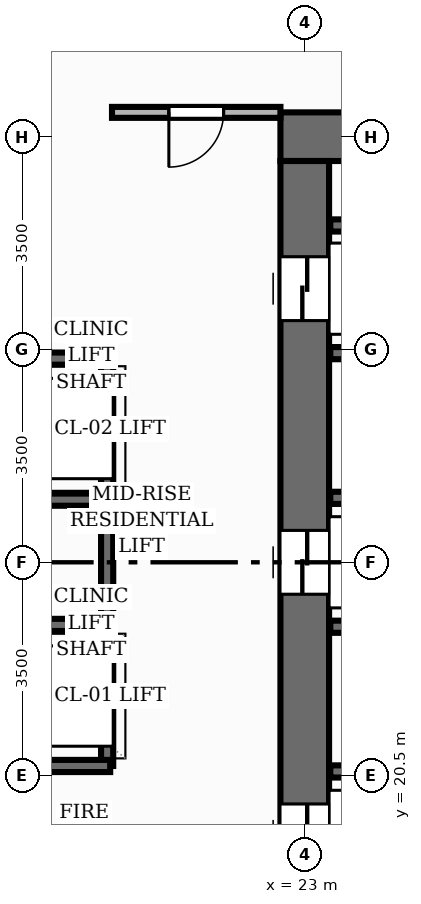
"""IFC4 building model, lengths in metres.
Left out: names, types, materials, properties, quantities, classifications, styles, units other than length and angle.
Written with IfcOpenShell. Run it as: python <this file> out.ifc"""

import sys

from ifc_helpers import new_model, si_unit, direction, frame, frame_2d, origin, place, context, subcontext, project, spatial, rectangle, extrude, element, fill, save


model = new_model("IFC4")
c1 = context("Model", 3, precision=1e-05, world=origin(), true_north=direction((0.0, 1.0)))
c2 = subcontext(c1, "Body", "Model", "MODEL_VIEW")
j1 = project(units=[si_unit("LENGTHUNIT", "METRE"), si_unit("PLANEANGLEUNIT", "RADIAN")], contexts=[c1])
p1 = place(None, origin())
s1 = spatial("IfcSite", under=j1, at=p1, CompositionType="ELEMENT")
p2 = place(p1, origin())
s2 = spatial("IfcBuilding", under=s1, at=p2, CompositionType="ELEMENT")
p3 = place(p2, origin())
s3 = spatial("IfcBuildingStorey", under=s2, at=p3, CompositionType="ELEMENT", Elevation=0.0)
p4 = place(p3, frame((22.6, 31.0, 0.0), z_axis=(0.0, 0.0, 1.0), x_axis=(1.0, 0.0, 0.0)))
e1 = element("IfcWall", 1, at=p4, inside=s3, PredefinedType="SHEAR", context=c2, shape_type="SweptSolid", body=[
    extrude(rectangle(XDim=18.8, YDim=0.8, at=frame_2d((9.4, 0.0))), origin(), (0.0, 0.0, 1.0), 4.0),
])
p5 = place(p4, frame((11.8, 0.0, 0.0)))
e2 = element("IfcOpeningElement", 2, at=p5, cuts=e1, PredefinedType="OPENING", context=c2, shape_type="SweptSolid", body=[
    extrude(rectangle(XDim=1.1, YDim=2.15, at=frame_2d((0.55, 1.075))), frame((0.0, 0.41, 0.0), z_axis=(0.0, -1.0, 0.0), x_axis=(1.0, 0.0, 0.0)), (0.0, 0.0, 1.0), 0.82),
])
p6 = place(p4, frame((4.425, 0.0, 0.0)))
e3 = element("IfcOpeningElement", 3, at=p6, cuts=e1, PredefinedType="OPENING", context=c2, shape_type="SweptSolid", body=[
    extrude(rectangle(XDim=1.05, YDim=2.15, at=frame_2d((0.525, 1.075))), frame((0.0, 0.41, 0.0), z_axis=(0.0, -1.0, 0.0), x_axis=(1.0, 0.0, 0.0)), (0.0, 0.0, 1.0), 0.82),
])
p7 = place(p4, frame((6.175, 0.0, 0.0)))
e4 = element("IfcOpeningElement", 4, at=p7, cuts=e1, PredefinedType="OPENING", context=c2, shape_type="SweptSolid", body=[
    extrude(rectangle(XDim=1.05, YDim=2.15, at=frame_2d((0.525, 1.075))), frame((0.0, 0.41, 0.0), z_axis=(0.0, -1.0, 0.0), x_axis=(1.0, 0.0, 0.0)), (0.0, 0.0, 1.0), 0.82),
])
p8 = place(p4, frame((7.925, 0.0, 0.0)))
e5 = element("IfcOpeningElement", 5, at=p8, cuts=e1, PredefinedType="OPENING", context=c2, shape_type="SweptSolid", body=[
    extrude(rectangle(XDim=1.05, YDim=2.15, at=frame_2d((0.525, 1.075))), frame((0.0, 0.41, 0.0), z_axis=(0.0, -1.0, 0.0), x_axis=(1.0, 0.0, 0.0)), (0.0, 0.0, 1.0), 0.82),
])
p9 = place(p3, frame((23.0, 17.4, 0.0), z_axis=(0.0, 0.0, 1.0), x_axis=(0.0, 1.0, 0.0)))
e6 = element("IfcWall", 6, at=p9, inside=s3, PredefinedType="SHEAR", context=c2, shape_type="SweptSolid", body=[
    extrude(rectangle(XDim=13.2, YDim=0.8, at=frame_2d((6.6, 0.0))), origin(), (0.0, 0.0, 1.0), 4.0),
])
p10 = place(p9, frame((1.575, 0.0, 0.0)))
e7 = element("IfcOpeningElement", 7, at=p10, cuts=e6, PredefinedType="OPENING", context=c2, shape_type="SweptSolid", body=[
    extrude(rectangle(XDim=1.05, YDim=2.15, at=frame_2d((0.525, 1.075))), frame((0.0, 0.41, 0.0), z_axis=(0.0, -1.0, 0.0), x_axis=(1.0, 0.0, 0.0)), (0.0, 0.0, 1.0), 0.82),
])
p11 = place(p9, frame((6.075, 0.0, 0.0)))
e8 = element("IfcOpeningElement", 8, at=p11, cuts=e6, PredefinedType="OPENING", context=c2, shape_type="SweptSolid", body=[
    extrude(rectangle(XDim=1.05, YDim=2.15, at=frame_2d((0.525, 1.075))), frame((0.0, 0.41, 0.0), z_axis=(0.0, -1.0, 0.0), x_axis=(1.0, 0.0, 0.0)), (0.0, 0.0, 1.0), 0.82),
])
p12 = place(p9, frame((10.575, 0.0, 0.0)))
e9 = element("IfcOpeningElement", 9, at=p12, cuts=e6, PredefinedType="OPENING", context=c2, shape_type="SweptSolid", body=[
    extrude(rectangle(XDim=1.05, YDim=2.15, at=frame_2d((0.525, 1.075))), frame((0.0, 0.41, 0.0), z_axis=(0.0, -1.0, 0.0), x_axis=(1.0, 0.0, 0.0)), (0.0, 0.0, 1.0), 0.82),
])
for number, where, z_axis, x_axis in (
    (10, (23.42, 29.54, 0.0), (0.0, 0.0, 1.0), (1.0, 0.0, 0.0)),
    (11, (23.42, 20.56, 0.0), (0.0, 0.0, 1.0), (1.0, 0.0, 0.0)),
    (12, (23.42, 22.94, 0.0), (0.0, 0.0, 1.0), (1.0, 0.0, 0.0)),
    (13, (23.42, 25.06, 0.0), (0.0, 0.0, 1.0), (1.0, 0.0, 0.0)),
    (14, (23.42, 27.44, 0.0), (0.0, 0.0, 1.0), (1.0, 0.0, 0.0)),
):
    element("IfcWall", number, at=place(p3, frame(where, z_axis=z_axis, x_axis=x_axis)), inside=s3, PredefinedType="SHEAR", context=c2, shape_type="SweptSolid", body=[
        extrude(rectangle(XDim=1.71, YDim=0.2, at=frame_2d((0.855, 0.0))), origin(), (0.0, 0.0, 1.0), 4.0),
    ])
p13 = place(p3, frame((19.75, 20.65, 0.0), z_axis=(0.0, 0.0, 1.0), x_axis=(0.0, 1.0, 0.0)))
e15 = element("IfcWall", 15, at=p13, inside=s3, PredefinedType="SHEAR", context=c2, shape_type="SweptSolid", body=[
    extrude(rectangle(XDim=6.7, YDim=0.2, at=frame_2d((3.35, 0.0))), origin(), (0.0, 0.0, 1.0), 4.0),
])
for number, where, z_axis, x_axis in (
    (16, (17.8, 20.65, 0.0), (0.0, 0.0, 1.0), (1.0, 0.0, 0.0)),
    (17, (17.8, 27.35, 0.0), (0.0, 0.0, 1.0), (1.0, 0.0, 0.0)),
):
    element("IfcWall", number, at=place(p3, frame(where, z_axis=z_axis, x_axis=x_axis)), inside=s3, PredefinedType="SHEAR", context=c2, shape_type="SweptSolid", body=[
        extrude(rectangle(XDim=2.0, YDim=0.2, at=frame_2d((1.0, 0.0))), origin(), (0.0, 0.0, 1.0), 4.0),
    ])
for number, where, z_axis, x_axis in (
    (18, (17.92, 22.97, 0.0), (0.0, 0.0, 1.0), (1.0, 0.0, 0.0)),
    (19, (17.92, 25.03, 0.0), (0.0, 0.0, 1.0), (1.0, 0.0, 0.0)),
):
    element("IfcWall", number, at=place(p3, frame(where, z_axis=z_axis, x_axis=x_axis)), inside=s3, PredefinedType="SHEAR", context=c2, shape_type="SweptSolid", body=[
        extrude(rectangle(XDim=1.76, YDim=0.2, at=frame_2d((0.88, 0.0))), origin(), (0.0, 0.0, 1.0), 4.0),
    ])
p14 = place(p3, frame((22.6, 31.4, 0.0), z_axis=(0.0, 0.0, 1.0), x_axis=(-1.0, 0.0, 0.0)))
e20 = element("IfcWall", 20, at=p14, inside=s3, PredefinedType="PARTITIONING", context=c2, shape_type="SweptSolid", body=[
    extrude(rectangle(XDim=2.77, YDim=0.18, at=frame_2d((1.385, 0.0))), origin(), (0.0, 0.0, 1.0), 3.715),
])
p15 = place(p14, frame((0.935, 0.0, 0.0)))
e21 = element("IfcOpeningElement", 21, at=p15, cuts=e20, PredefinedType="OPENING", context=c2, shape_type="SweptSolid", body=[
    extrude(rectangle(XDim=0.9, YDim=2.1, at=frame_2d((0.45, 1.05))), frame((0.0, 0.1, 0.0), z_axis=(0.0, -1.0, 0.0), x_axis=(1.0, 0.0, 0.0)), (0.0, 0.0, 1.0), 0.2),
])
p16 = place(p10, origin())
e22 = element("IfcDoor", 22, at=p16, inside=s3, OperationType="DOUBLE_DOOR_SLIDING", PredefinedType="DOOR", context=c2, shape_type="SweptSolid", body=[
    extrude(rectangle(XDim=1.05, YDim=2.15, at=frame_2d((0.525, 1.075))), frame((0.0, 0.025, 0.0), z_axis=(0.0, -1.0, 0.0), x_axis=(1.0, 0.0, 0.0)), (0.0, 0.0, 1.0), 0.05),
])
fill(e7, e22)
p17 = place(p11, origin())
e23 = element("IfcDoor", 23, at=p17, inside=s3, OperationType="DOUBLE_DOOR_SLIDING", PredefinedType="DOOR", context=c2, shape_type="SweptSolid", body=[
    extrude(rectangle(XDim=1.05, YDim=2.15, at=frame_2d((0.525, 1.075))), frame((0.0, 0.025, 0.0), z_axis=(0.0, -1.0, 0.0), x_axis=(1.0, 0.0, 0.0)), (0.0, 0.0, 1.0), 0.05),
])
fill(e8, e23)
p18 = place(p12, origin())
e24 = element("IfcDoor", 24, at=p18, inside=s3, OperationType="DOUBLE_DOOR_SLIDING", PredefinedType="DOOR", context=c2, shape_type="SweptSolid", body=[
    extrude(rectangle(XDim=1.05, YDim=2.15, at=frame_2d((0.525, 1.075))), frame((0.0, 0.025, 0.0), z_axis=(0.0, -1.0, 0.0), x_axis=(1.0, 0.0, 0.0)), (0.0, 0.0, 1.0), 0.05),
])
fill(e9, e24)
p19 = place(p15, origin())
e25 = element("IfcDoor", 25, at=p19, inside=s3, OperationType="SINGLE_SWING_RIGHT", PredefinedType="DOOR", context=c2, shape_type="SweptSolid", body=[
    extrude(rectangle(XDim=0.9, YDim=2.1, at=frame_2d((0.45, 1.05))), frame((0.0, 0.025, 0.0), z_axis=(0.0, -1.0, 0.0), x_axis=(1.0, 0.0, 0.0)), (0.0, 0.0, 1.0), 0.05),
])
fill(e21, e25)
save(model, sys.argv[1])
